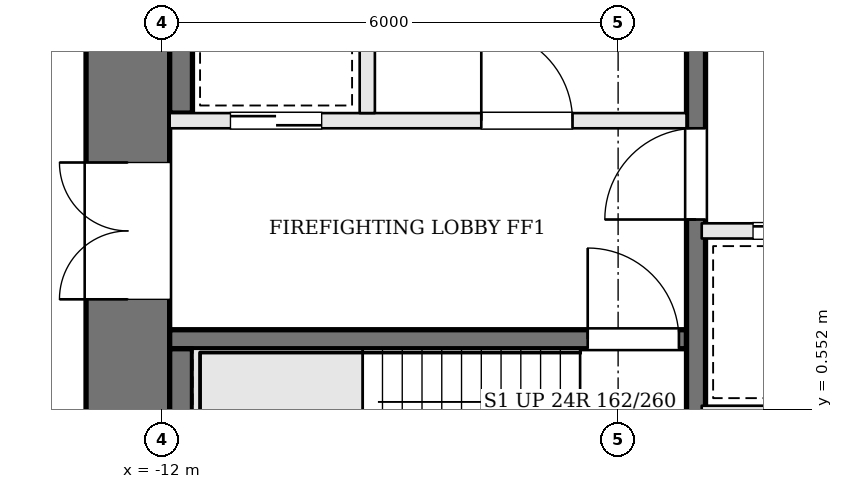
"""IFC4 building model, lengths in metres.
Left out: names, types, materials, properties, quantities, classifications, styles, units other than length and angle.
Written with IfcOpenShell. Run it as: python <this file> out.ifc"""

import sys

from ifc_helpers import new_model, si_unit, direction, frame, frame_2d, origin, place, context, subcontext, project, spatial, rectangle, extrude, element, fill, save


model = new_model("IFC4")
c1 = context("Model", 3, precision=1e-05, world=origin(), true_north=direction((0.0, 1.0)))
c2 = subcontext(c1, "Body", "Model", "MODEL_VIEW")
j1 = project(units=[si_unit("LENGTHUNIT", "METRE"), si_unit("PLANEANGLEUNIT", "RADIAN")], contexts=[c1])
p1 = place(None, origin())
s1 = spatial("IfcSite", under=j1, at=p1, CompositionType="ELEMENT")
p2 = place(p1, origin())
s2 = spatial("IfcBuilding", under=s1, at=p2, CompositionType="ELEMENT")
p3 = place(p2, frame((0.0, 0.0, 130.5)))
s3 = spatial("IfcBuildingStorey", under=s2, at=p3, CompositionType="ELEMENT", Elevation=130.5)
p4 = place(p3, frame((-12.45, -1.9, 0.0), z_axis=(0.0, 0.0, 1.0), x_axis=(0.0, 1.0, 0.0)))
e1 = element("IfcWall", 1, at=p4, inside=s3, PredefinedType="SHEAR", context=c2, shape_type="SweptSolid", body=[
    extrude(rectangle(XDim=12.8, YDim=1.1, at=frame_2d((6.4, 0.0))), origin(), (0.0, 0.0, 1.0), 3.9),
])
p5 = place(p4, frame((3.9, 0.0, 0.0)))
e2 = element("IfcOpeningElement", 2, at=p5, cuts=e1, PredefinedType="OPENING", context=c2, shape_type="SweptSolid", body=[
    extrude(rectangle(XDim=1.8, YDim=2.1, at=frame_2d((0.9, 1.05))), frame((0.0, 0.56, 0.0), z_axis=(0.0, -1.0, 0.0), x_axis=(1.0, 0.0, 0.0)), (0.0, 0.0, 1.0), 1.12),
])
p6 = place(p3, frame((-11.9, 1.475, 0.0), z_axis=(0.0, 0.0, 1.0), x_axis=(1.0, 0.0, 0.0)))
e3 = element("IfcWall", 3, at=p6, inside=s3, PredefinedType="SOLIDWALL", context=c2, shape_type="SweptSolid", body=[
    extrude(rectangle(XDim=6.8, YDim=0.25, at=frame_2d((3.4, 0.0))), origin(), (0.0, 0.0, 1.0), 3.7),
])
p7 = place(p6, frame((5.5, 0.0, 0.0)))
e4 = element("IfcOpeningElement", 4, at=p7, cuts=e3, PredefinedType="OPENING", context=c2, shape_type="SweptSolid", body=[
    extrude(rectangle(XDim=1.2, YDim=2.1, at=frame_2d((0.6, 1.05))), frame((0.0, 0.135, 0.0), z_axis=(0.0, -1.0, 0.0), x_axis=(1.0, 0.0, 0.0)), (0.0, 0.0, 1.0), 0.27),
])
p8 = place(p3, frame((-11.9, 4.35, 0.0), z_axis=(0.0, 0.0, 1.0), x_axis=(1.0, 0.0, 0.0)))
e5 = element("IfcWall", 5, at=p8, inside=s3, PredefinedType="SOLIDWALL", context=c2, shape_type="SweptSolid", body=[
    extrude(rectangle(XDim=6.8, YDim=0.2, at=frame_2d((3.4, 0.0))), origin(), (0.0, 0.0, 1.0), 3.7),
])
p9 = place(p8, frame((4.1, 0.0, 0.0)))
e6 = element("IfcOpeningElement", 6, at=p9, cuts=e5, PredefinedType="OPENING", context=c2, shape_type="SweptSolid", body=[
    extrude(rectangle(XDim=1.2, YDim=2.1, at=frame_2d((0.6, 1.05))), frame((0.0, 0.11, 0.0), z_axis=(0.0, -1.0, 0.0), x_axis=(1.0, 0.0, 0.0)), (0.0, 0.0, 1.0), 0.22),
])
p10 = place(p8, frame((0.8, 0.0, 0.0)))
e7 = element("IfcOpeningElement", 7, at=p10, cuts=e5, PredefinedType="OPENING", context=c2, shape_type="SweptSolid", body=[
    extrude(rectangle(XDim=1.2, YDim=2.1, at=frame_2d((0.6, 1.05))), frame((0.0, 0.11, 0.0), z_axis=(0.0, -1.0, 0.0), x_axis=(1.0, 0.0, 0.0)), (0.0, 0.0, 1.0), 0.22),
])
p11 = place(p3, frame((-9.3, 4.45, 0.0), z_axis=(0.0, 0.0, 1.0), x_axis=(0.0, 1.0, 0.0)))
e8 = element("IfcWall", 8, at=p11, inside=s3, PredefinedType="SOLIDWALL", context=c2, shape_type="SweptSolid", body=[
    extrude(rectangle(XDim=3.0, YDim=0.2, at=frame_2d((1.5, 0.0))), origin(), (0.0, 0.0, 1.0), 3.7),
])
p12 = place(p3, frame((-4.975, -1.9, 0.0), z_axis=(0.0, 0.0, 1.0), x_axis=(0.0, 1.0, 0.0)))
e9 = element("IfcWall", 9, at=p12, inside=s3, PredefinedType="SOLIDWALL", context=c2, shape_type="SweptSolid", body=[
    extrude(rectangle(XDim=12.8, YDim=0.25, at=frame_2d((6.4, 0.0))), origin(), (0.0, 0.0, 1.0), 3.7),
])
p13 = place(p12, frame((4.95, 0.0, 0.0)))
e10 = element("IfcOpeningElement", 10, at=p13, cuts=e9, PredefinedType="OPENING", context=c2, shape_type="SweptSolid", body=[
    extrude(rectangle(XDim=1.2, YDim=2.1, at=frame_2d((0.6, 1.05))), frame((0.0, 0.135, 0.0), z_axis=(0.0, -1.0, 0.0), x_axis=(1.0, 0.0, 0.0)), (0.0, 0.0, 1.0), 0.27),
])
p14 = place(p3, frame((-11.75, -1.6, 0.0), z_axis=(0.0, 0.0, 1.0), x_axis=(0.0, 1.0, 0.0)))
e11 = element("IfcWall", 11, at=p14, inside=s3, PredefinedType="SOLIDWALL", context=c2, shape_type="SweptSolid", body=[
    extrude(rectangle(XDim=2.95, YDim=0.3, at=frame_2d((1.475, 0.0))), origin(), (0.0, 0.0, 1.0), 3.7),
])
p15 = place(p3, frame((-11.75, 4.45, 0.0), z_axis=(0.0, 0.0, 1.0), x_axis=(0.0, 1.0, 0.0)))
e12 = element("IfcWall", 12, at=p15, inside=s3, PredefinedType="SOLIDWALL", context=c2, shape_type="SweptSolid", body=[
    extrude(rectangle(XDim=3.0, YDim=0.3, at=frame_2d((1.5, 0.0))), origin(), (0.0, 0.0, 1.0), 3.7),
])
p16 = place(p3, frame((-4.9, 0.5, 0.0), z_axis=(0.0, 0.0, 1.0), x_axis=(1.0, 0.0, 0.0)))
e13 = element("IfcWall", 13, at=p16, inside=s3, PredefinedType="SOLIDWALL", context=c2, shape_type="SweptSolid", body=[
    extrude(rectangle(XDim=9.8, YDim=0.2, at=frame_2d((4.9, 0.0))), origin(), (0.0, 0.0, 1.0), 3.7),
])
p17 = place(p3, frame((-4.9, 2.9, 0.0), z_axis=(0.0, 0.0, 1.0), x_axis=(1.0, 0.0, 0.0)))
e14 = element("IfcWall", 14, at=p17, inside=s3, PredefinedType="SOLIDWALL", context=c2, shape_type="SweptSolid", body=[
    extrude(rectangle(XDim=9.8, YDim=0.2, at=frame_2d((4.9, 0.0))), origin(), (0.0, 0.0, 1.0), 3.7),
])
p18 = place(p17, frame((0.675, 0.0, 0.0)))
e15 = element("IfcOpeningElement", 15, at=p18, cuts=e14, PredefinedType="OPENING", context=c2, shape_type="SweptSolid", body=[
    extrude(rectangle(XDim=1.1, YDim=2.1, at=frame_2d((0.55, 1.05))), frame((0.0, 0.11, 0.0), z_axis=(0.0, -1.0, 0.0), x_axis=(1.0, 0.0, 0.0)), (0.0, 0.0, 1.0), 0.22),
])
p19 = place(p17, frame((3.175, 0.0, 0.0)))
e16 = element("IfcOpeningElement", 16, at=p19, cuts=e14, PredefinedType="OPENING", context=c2, shape_type="SweptSolid", body=[
    extrude(rectangle(XDim=1.0, YDim=2.1, at=frame_2d((0.5, 1.05))), frame((0.0, 0.11, 0.0), z_axis=(0.0, -1.0, 0.0), x_axis=(1.0, 0.0, 0.0)), (0.0, 0.0, 1.0), 0.22),
])
p20 = place(p5, origin())
e17 = element("IfcDoor", 17, at=p20, inside=s3, OperationType="DOUBLE_DOOR_SINGLE_SWING", PredefinedType="DOOR", context=c2, shape_type="SweptSolid", body=[
    extrude(rectangle(XDim=1.8, YDim=2.1, at=frame_2d((0.9, 1.05))), frame((0.0, 0.025, 0.0), z_axis=(0.0, -1.0, 0.0), x_axis=(1.0, 0.0, 0.0)), (0.0, 0.0, 1.0), 0.05),
])
fill(e2, e17)
p21 = place(p13, origin())
e18 = element("IfcDoor", 18, at=p21, inside=s3, OperationType="SINGLE_SWING_LEFT", PredefinedType="DOOR", context=c2, shape_type="SweptSolid", body=[
    extrude(rectangle(XDim=1.2, YDim=2.1, at=frame_2d((0.6, 1.05))), frame((0.0, 0.025, 0.0), z_axis=(0.0, -1.0, 0.0), x_axis=(1.0, 0.0, 0.0)), (0.0, 0.0, 1.0), 0.05),
])
fill(e10, e18)
p22 = place(p9, origin())
e19 = element("IfcDoor", 19, at=p22, inside=s3, OperationType="SINGLE_SWING_LEFT", PredefinedType="DOOR", context=c2, shape_type="SweptSolid", body=[
    extrude(rectangle(XDim=1.2, YDim=2.1, at=frame_2d((0.6, 1.05))), frame((0.0, 0.025, 0.0), z_axis=(0.0, -1.0, 0.0), x_axis=(1.0, 0.0, 0.0)), (0.0, 0.0, 1.0), 0.05),
])
fill(e6, e19)
p23 = place(p7, origin())
e20 = element("IfcDoor", 20, at=p23, inside=s3, OperationType="SINGLE_SWING_LEFT", PredefinedType="DOOR", context=c2, shape_type="SweptSolid", body=[
    extrude(rectangle(XDim=1.2, YDim=2.1, at=frame_2d((0.6, 1.05))), frame((0.0, 0.025, 0.0), z_axis=(0.0, -1.0, 0.0), x_axis=(1.0, 0.0, 0.0)), (0.0, 0.0, 1.0), 0.05),
])
fill(e4, e20)
p24 = place(p10, origin())
e21 = element("IfcDoor", 21, at=p24, inside=s3, OperationType="SLIDING_TO_RIGHT", PredefinedType="DOOR", context=c2, shape_type="SweptSolid", body=[
    extrude(rectangle(XDim=1.2, YDim=2.1, at=frame_2d((0.6, 1.05))), frame((0.0, 0.025, 0.0), z_axis=(0.0, -1.0, 0.0), x_axis=(1.0, 0.0, 0.0)), (0.0, 0.0, 1.0), 0.05),
])
fill(e7, e21)
p25 = place(p18, origin())
e22 = element("IfcDoor", 22, at=p25, inside=s3, OperationType="SLIDING_TO_RIGHT", PredefinedType="DOOR", context=c2, shape_type="SweptSolid", body=[
    extrude(rectangle(XDim=1.1, YDim=2.1, at=frame_2d((0.55, 1.05))), frame((0.0, 0.025, 0.0), z_axis=(0.0, -1.0, 0.0), x_axis=(1.0, 0.0, 0.0)), (0.0, 0.0, 1.0), 0.05),
])
fill(e15, e22)
save(model, sys.argv[1])
